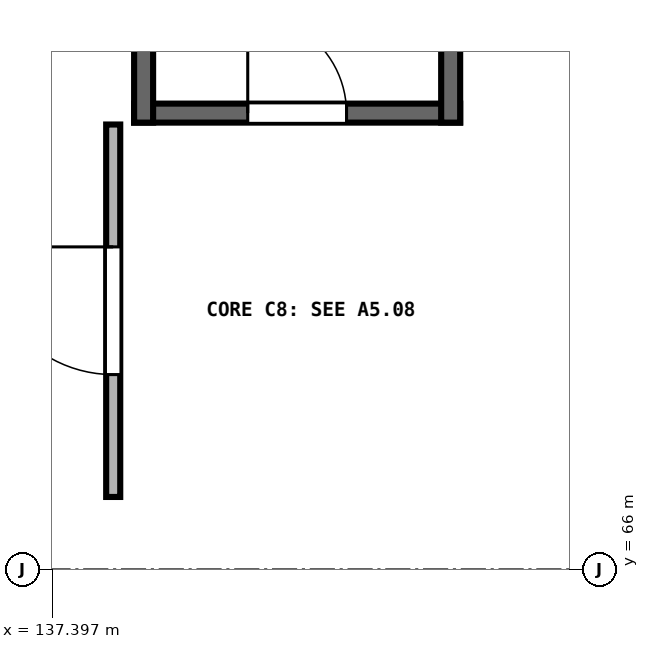
"""IFC4 building model, lengths in metres.
Left out: names, types, materials, properties, quantities, classifications, styles, units other than length and angle.
Written with IfcOpenShell. Run it as: python <this file> out.ifc"""

import sys

from ifc_helpers import new_model, si_unit, direction, frame, frame_2d, origin, place, context, subcontext, project, spatial, rectangle, extrude, element, fill, save


model = new_model("IFC4")
c1 = context("Model", 3, precision=1e-05, world=origin(), true_north=direction((0.0, 1.0)))
c2 = subcontext(c1, "Body", "Model", "MODEL_VIEW")
j1 = project(units=[si_unit("LENGTHUNIT", "METRE"), si_unit("PLANEANGLEUNIT", "RADIAN")], contexts=[c1])
p1 = place(None, origin())
s1 = spatial("IfcSite", under=j1, at=p1, CompositionType="ELEMENT")
p2 = place(p1, origin())
s2 = spatial("IfcBuilding", under=s1, at=p2, CompositionType="ELEMENT")
p3 = place(p2, frame((0.0, 0.0, 5.4)))
s3 = spatial("IfcBuildingStorey", under=s2, at=p3, CompositionType="ELEMENT", Elevation=5.4)
p4 = place(p3, frame((138.475, 72.0, 0.0), z_axis=(0.0, 0.0, 1.0), x_axis=(1.0, 0.0, 0.0)))
e1 = element("IfcWall", 1, at=p4, inside=s3, PredefinedType="SHEAR", context=c2, shape_type="SweptSolid", body=[
    extrude(rectangle(XDim=4.29, YDim=0.25, at=frame_2d((2.145, 0.0))), origin(), (0.0, 0.0, 1.0), 4.54),
])
p5 = place(p4, frame((1.495, 0.0, 0.0)))
e2 = element("IfcOpeningElement", 2, at=p5, cuts=e1, PredefinedType="OPENING", context=c2, shape_type="SweptSolid", body=[
    extrude(rectangle(XDim=1.3, YDim=2.18, at=frame_2d((0.65, 1.09))), frame((0.0, 0.135, 0.0), z_axis=(0.0, -1.0, 0.0), x_axis=(1.0, 0.0, 0.0)), (0.0, 0.0, 1.0), 0.27),
])
for number, where, z_axis, x_axis in (
    (3, (138.6, 71.875, 0.0), (0.0, 0.0, 1.0), (0.0, 1.0, 0.0)),
    (4, (142.64, 71.875, 0.0), (0.0, 0.0, 1.0), (0.0, 1.0, 0.0)),
):
    element("IfcWall", number, at=place(p3, frame(where, z_axis=z_axis, x_axis=x_axis)), inside=s3, PredefinedType="SHEAR", context=c2, shape_type="SweptSolid", body=[
        extrude(rectangle(XDim=11.09, YDim=0.25, at=frame_2d((5.545, 0.0))), origin(), (0.0, 0.0, 1.0), 4.54),
    ])
p6 = place(p3, frame((138.2, 66.95, 0.0), z_axis=(0.0, 0.0, 1.0), x_axis=(0.0, 1.0, 0.0)))
e5 = element("IfcWall", 5, at=p6, inside=s3, PredefinedType="PARTITIONING", context=c2, shape_type="SweptSolid", body=[
    extrude(rectangle(XDim=4.9, YDim=0.185, at=frame_2d((2.45, 0.0))), origin(), (0.0, 0.0, 1.0), 4.49),
])
p7 = place(p6, frame((1.61, 0.0, 0.0)))
e6 = element("IfcOpeningElement", 6, at=p7, cuts=e5, PredefinedType="OPENING", context=c2, shape_type="SweptSolid", body=[
    extrude(rectangle(XDim=1.68, YDim=2.25, at=frame_2d((0.84, 1.125))), frame((0.0, 0.103, 0.0), z_axis=(0.0, -1.0, 0.0), x_axis=(1.0, 0.0, 0.0)), (0.0, 0.0, 1.0), 0.205),
])
p8 = place(p5, origin())
e7 = element("IfcDoor", 7, at=p8, inside=s3, OperationType="SINGLE_SWING_LEFT", PredefinedType="DOOR", context=c2, shape_type="SweptSolid", body=[
    extrude(rectangle(XDim=1.3, YDim=2.18, at=frame_2d((0.65, 1.09))), frame((0.0, 0.025, 0.0), z_axis=(0.0, -1.0, 0.0), x_axis=(1.0, 0.0, 0.0)), (0.0, 0.0, 1.0), 0.05),
])
fill(e2, e7)
p9 = place(p7, origin())
e8 = element("IfcDoor", 8, at=p9, inside=s3, OperationType="SINGLE_SWING_RIGHT", PredefinedType="DOOR", context=c2, shape_type="SweptSolid", body=[
    extrude(rectangle(XDim=1.68, YDim=2.25, at=frame_2d((0.84, 1.125))), frame((0.0, 0.025, 0.0), z_axis=(0.0, -1.0, 0.0), x_axis=(1.0, 0.0, 0.0)), (0.0, 0.0, 1.0), 0.05),
])
fill(e6, e8)
save(model, sys.argv[1])
